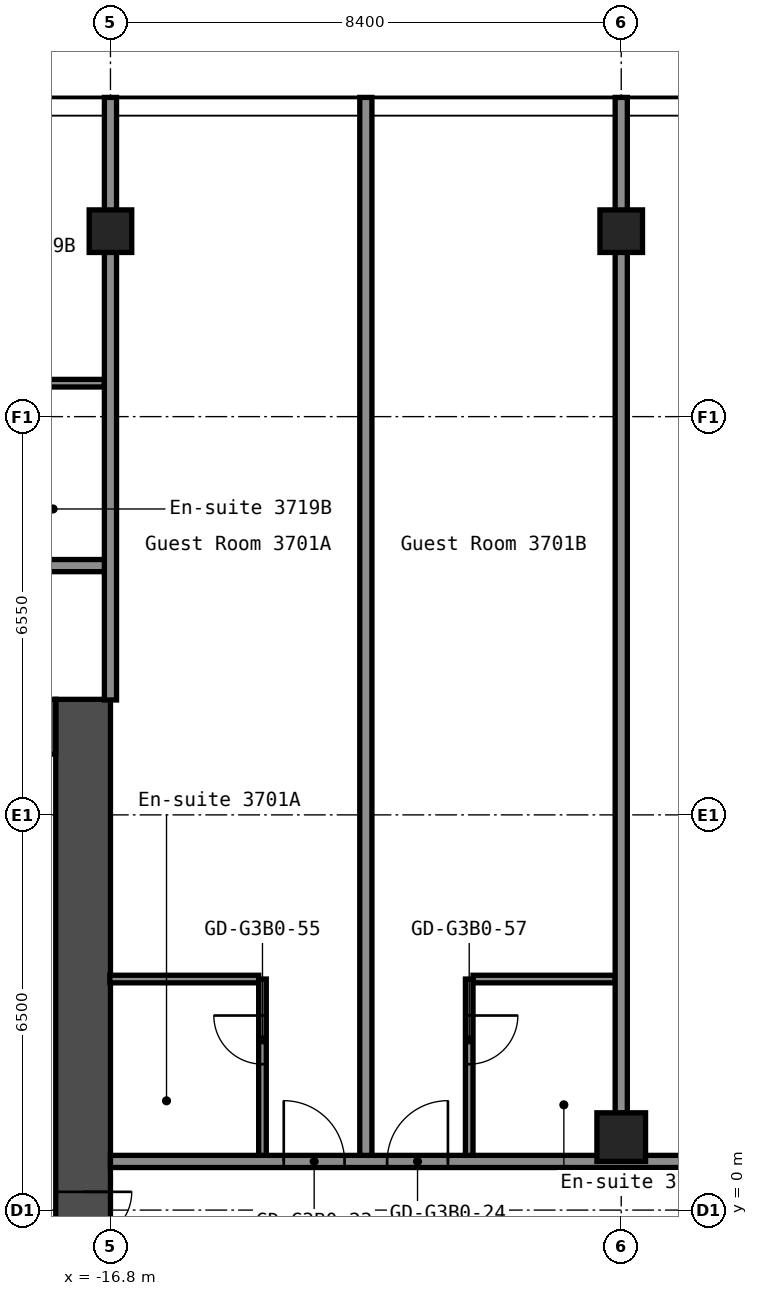
"""IFC4 building model, lengths in metres.
Left out: names, types, materials, properties, quantities, classifications, styles, units other than length and angle.
Written with IfcOpenShell. Run it as: python <this file> out.ifc"""

import sys

from ifc_helpers import new_model, si_unit, direction, frame, frame_2d, origin, origin_2d, place, context, subcontext, project, spatial, rectangle, hollow_rectangle, extrude, element, fill, save


model = new_model("IFC4")
c1 = context("Model", 3, precision=1e-05, world=origin(), true_north=direction((0.0, 1.0)))
c2 = subcontext(c1, "Body", "Model", "MODEL_VIEW")
j1 = project(units=[si_unit("LENGTHUNIT", "METRE"), si_unit("PLANEANGLEUNIT", "RADIAN")], contexts=[c1])
p1 = place(None, origin())
s1 = spatial("IfcSite", under=j1, at=p1, CompositionType="ELEMENT")
p2 = place(p1, origin())
s2 = spatial("IfcBuilding", under=s1, at=p2, CompositionType="ELEMENT")
p3 = place(p2, frame((0.0, 0.0, 134.2)))
s3 = spatial("IfcBuildingStorey", under=s2, at=p3, CompositionType="ELEMENT", Elevation=134.2)
p4 = place(p3, frame((-16.8, 16.1, 0.0), z_axis=(0.0, 0.0, 1.0), x_axis=(1.0, 0.0, 0.0)))
e1 = element("IfcColumn", 1, at=p4, inside=s3, PredefinedType="COLUMN", context=c2, shape_type="SweptSolid", body=[
    extrude(hollow_rectangle(XDim=0.7, YDim=0.7, WallThickness=0.028, at=origin_2d()), origin(), (0.0, 0.0, 1.0), 2.75),
])
p5 = place(p3, frame((-8.4, 1.2, 0.0), z_axis=(0.0, 0.0, 1.0), x_axis=(1.0, 0.0, 0.0)))
e2 = element("IfcColumn", 2, at=p5, inside=s3, PredefinedType="COLUMN", context=c2, shape_type="SweptSolid", body=[
    extrude(hollow_rectangle(XDim=0.8, YDim=0.8, WallThickness=0.032, at=origin_2d()), origin(), (0.0, 0.0, 1.0), 2.75),
])
p6 = place(p3, frame((-8.4, 16.1, 0.0), z_axis=(0.0, 0.0, 1.0), x_axis=(1.0, 0.0, 0.0)))
e3 = element("IfcColumn", 3, at=p6, inside=s3, PredefinedType="COLUMN", context=c2, shape_type="SweptSolid", body=[
    extrude(hollow_rectangle(XDim=0.7, YDim=0.7, WallThickness=0.028, at=origin_2d()), origin(), (0.0, 0.0, 1.0), 2.75),
])
p7 = place(p3, frame((-17.25, -8.4, 0.0), z_axis=(0.0, 0.0, 1.0), x_axis=(0.0, 1.0, 0.0)))
e4 = element("IfcWall", 4, at=p7, inside=s3, PredefinedType="SHEAR", context=c2, shape_type="SweptSolid", body=[
    extrude(rectangle(XDim=16.8, YDim=0.9, at=frame_2d((8.4, 0.0))), origin(), (0.0, 0.0, 1.0), 2.75),
])
p8 = place(p7, frame((7.1, 0.0, 0.0)))
e5 = element("IfcOpeningElement", 5, at=p8, cuts=e4, PredefinedType="OPENING", context=c2, shape_type="SweptSolid", body=[
    extrude(rectangle(XDim=1.6, YDim=2.1, at=frame_2d((0.8, 1.05))), frame((0.0, 0.46, 0.0), z_axis=(0.0, -1.0, 0.0), x_axis=(1.0, 0.0, 0.0)), (0.0, 0.0, 1.0), 0.92),
])
p9 = place(p3, frame((-32.7, 7.95, 0.0), z_axis=(0.0, 0.0, 1.0), x_axis=(1.0, 0.0, 0.0)))
e6 = element("IfcWall", 6, at=p9, inside=s3, PredefinedType="SHEAR", context=c2, shape_type="SweptSolid", body=[
    extrude(rectangle(XDim=15.0, YDim=0.9, at=frame_2d((7.5, 0.0))), origin(), (0.0, 0.0, 1.0), 2.75),
])
p10 = place(p9, frame((3.4, 0.0, 0.0)))
e7 = element("IfcOpeningElement", 7, at=p10, cuts=e6, PredefinedType="OPENING", context=c2, shape_type="SweptSolid", body=[
    extrude(rectangle(XDim=1.2, YDim=2.1, at=frame_2d((0.6, 1.05))), frame((0.0, 0.46, 0.0), z_axis=(0.0, -1.0, 0.0), x_axis=(1.0, 0.0, 0.0)), (0.0, 0.0, 1.0), 0.92),
])
p11 = place(p9, frame((0.75, 0.0, 0.0)))
e8 = element("IfcOpeningElement", 8, at=p11, cuts=e6, PredefinedType="OPENING", context=c2, shape_type="SweptSolid", body=[
    extrude(rectangle(XDim=0.9, YDim=2.1, at=frame_2d((0.45, 1.05))), frame((0.0, 0.46, 0.0), z_axis=(0.0, -1.0, 0.0), x_axis=(1.0, 0.0, 0.0)), (0.0, 0.0, 1.0), 0.92),
])
p12 = place(p3, frame((-16.8, 0.8, 0.0), z_axis=(0.0, 0.0, 1.0), x_axis=(1.0, 0.0, 0.0)))
e9 = element("IfcWall", 9, at=p12, inside=s3, PredefinedType="PARTITIONING", context=c2, shape_type="SweptSolid", body=[
    extrude(rectangle(XDim=33.6, YDim=0.2, at=frame_2d((16.8, 0.0))), origin(), (0.0, 0.0, 1.0), 2.75),
])
p13 = place(p12, frame((2.85, 0.0, 0.0)))
e10 = element("IfcOpeningElement", 10, at=p13, cuts=e9, PredefinedType="OPENING", context=c2, shape_type="SweptSolid", body=[
    extrude(rectangle(XDim=1.0, YDim=2.1, at=frame_2d((0.5, 1.05))), frame((0.0, 0.11, 0.0), z_axis=(0.0, -1.0, 0.0), x_axis=(1.0, 0.0, 0.0)), (0.0, 0.0, 1.0), 0.22),
])
p14 = place(p12, frame((4.55, 0.0, 0.0)))
e11 = element("IfcOpeningElement", 11, at=p14, cuts=e9, PredefinedType="OPENING", context=c2, shape_type="SweptSolid", body=[
    extrude(rectangle(XDim=1.0, YDim=2.1, at=frame_2d((0.5, 1.05))), frame((0.0, 0.11, 0.0), z_axis=(0.0, -1.0, 0.0), x_axis=(1.0, 0.0, 0.0)), (0.0, 0.0, 1.0), 0.22),
])
p15 = place(p12, frame((12.1, 0.0, 0.0)))
e12 = element("IfcOpeningElement", 12, at=p15, cuts=e9, PredefinedType="OPENING", context=c2, shape_type="SweptSolid", body=[
    extrude(rectangle(XDim=1.0, YDim=2.1, at=frame_2d((0.5, 1.05))), frame((0.0, 0.11, 0.0), z_axis=(0.0, -1.0, 0.0), x_axis=(1.0, 0.0, 0.0)), (0.0, 0.0, 1.0), 0.22),
])
p16 = place(p12, frame((19.65, 0.0, 0.0)))
e13 = element("IfcOpeningElement", 13, at=p16, cuts=e9, PredefinedType="OPENING", context=c2, shape_type="SweptSolid", body=[
    extrude(rectangle(XDim=1.0, YDim=2.1, at=frame_2d((0.5, 1.05))), frame((0.0, 0.11, 0.0), z_axis=(0.0, -1.0, 0.0), x_axis=(1.0, 0.0, 0.0)), (0.0, 0.0, 1.0), 0.22),
])
p17 = place(p12, frame((21.35, 0.0, 0.0)))
e14 = element("IfcOpeningElement", 14, at=p17, cuts=e9, PredefinedType="OPENING", context=c2, shape_type="SweptSolid", body=[
    extrude(rectangle(XDim=1.0, YDim=2.1, at=frame_2d((0.5, 1.05))), frame((0.0, 0.11, 0.0), z_axis=(0.0, -1.0, 0.0), x_axis=(1.0, 0.0, 0.0)), (0.0, 0.0, 1.0), 0.22),
])
p18 = place(p12, frame((28.05, 0.0, 0.0)))
e15 = element("IfcOpeningElement", 15, at=p18, cuts=e9, PredefinedType="OPENING", context=c2, shape_type="SweptSolid", body=[
    extrude(rectangle(XDim=1.0, YDim=2.1, at=frame_2d((0.5, 1.05))), frame((0.0, 0.11, 0.0), z_axis=(0.0, -1.0, 0.0), x_axis=(1.0, 0.0, 0.0)), (0.0, 0.0, 1.0), 0.22),
])
p19 = place(p12, frame((29.75, 0.0, 0.0)))
e16 = element("IfcOpeningElement", 16, at=p19, cuts=e9, PredefinedType="OPENING", context=c2, shape_type="SweptSolid", body=[
    extrude(rectangle(XDim=1.0, YDim=2.1, at=frame_2d((0.5, 1.05))), frame((0.0, 0.11, 0.0), z_axis=(0.0, -1.0, 0.0), x_axis=(1.0, 0.0, 0.0)), (0.0, 0.0, 1.0), 0.22),
])
p20 = place(p3, frame((-16.81, 3.8, 0.0), z_axis=(0.0, 0.0, 1.0), x_axis=(1.0, 0.0, 0.0)))
e17 = element("IfcWall", 17, at=p20, inside=s3, PredefinedType="PARTITIONING", context=c2, shape_type="SweptSolid", body=[
    extrude(rectangle(XDim=2.448, YDim=0.125, at=frame_2d((1.224, 0.0))), origin(), (0.0, 0.0, 1.0), 2.75),
])
p21 = place(p3, frame((-10.837, 3.8, 0.0), z_axis=(0.0, 0.0, 1.0), x_axis=(1.0, 0.0, 0.0)))
e18 = element("IfcWall", 18, at=p21, inside=s3, PredefinedType="PARTITIONING", context=c2, shape_type="SweptSolid", body=[
    extrude(rectangle(XDim=2.337, YDim=0.125, at=frame_2d((1.169, 0.0))), origin(), (0.0, 0.0, 1.0), 2.75),
])
p22 = place(p3, frame((-42.7, 10.6, 0.0), z_axis=(0.0, 0.0, 1.0), x_axis=(1.0, 0.0, 0.0)))
e19 = element("IfcWall", 19, at=p22, inside=s3, PredefinedType="PARTITIONING", context=c2, shape_type="SweptSolid", body=[
    extrude(rectangle(XDim=25.9, YDim=0.2, at=frame_2d((12.95, 0.0))), origin(), (0.0, 0.0, 1.0), 2.75),
])
p23 = place(p22, frame((3.25, 0.0, 0.0)))
e20 = element("IfcOpeningElement", 20, at=p23, cuts=e19, PredefinedType="OPENING", context=c2, shape_type="SweptSolid", body=[
    extrude(rectangle(XDim=1.0, YDim=2.1, at=frame_2d((0.5, 1.05))), frame((0.0, 0.11, 0.0), z_axis=(0.0, -1.0, 0.0), x_axis=(1.0, 0.0, 0.0)), (0.0, 0.0, 1.0), 0.22),
])
p24 = place(p22, frame((5.15, 0.0, 0.0)))
e21 = element("IfcOpeningElement", 21, at=p24, cuts=e19, PredefinedType="OPENING", context=c2, shape_type="SweptSolid", body=[
    extrude(rectangle(XDim=1.0, YDim=2.1, at=frame_2d((0.5, 1.05))), frame((0.0, 0.11, 0.0), z_axis=(0.0, -1.0, 0.0), x_axis=(1.0, 0.0, 0.0)), (0.0, 0.0, 1.0), 0.22),
])
p25 = place(p22, frame((11.95, 0.0, 0.0)))
e22 = element("IfcOpeningElement", 22, at=p25, cuts=e19, PredefinedType="OPENING", context=c2, shape_type="SweptSolid", body=[
    extrude(rectangle(XDim=1.0, YDim=2.1, at=frame_2d((0.5, 1.05))), frame((0.0, 0.11, 0.0), z_axis=(0.0, -1.0, 0.0), x_axis=(1.0, 0.0, 0.0)), (0.0, 0.0, 1.0), 0.22),
])
p26 = place(p22, frame((13.65, 0.0, 0.0)))
e23 = element("IfcOpeningElement", 23, at=p26, cuts=e19, PredefinedType="OPENING", context=c2, shape_type="SweptSolid", body=[
    extrude(rectangle(XDim=1.0, YDim=2.1, at=frame_2d((0.5, 1.05))), frame((0.0, 0.11, 0.0), z_axis=(0.0, -1.0, 0.0), x_axis=(1.0, 0.0, 0.0)), (0.0, 0.0, 1.0), 0.22),
])
p27 = place(p22, frame((20.35, 0.0, 0.0)))
e24 = element("IfcOpeningElement", 24, at=p27, cuts=e19, PredefinedType="OPENING", context=c2, shape_type="SweptSolid", body=[
    extrude(rectangle(XDim=1.0, YDim=2.1, at=frame_2d((0.5, 1.05))), frame((0.0, 0.11, 0.0), z_axis=(0.0, -1.0, 0.0), x_axis=(1.0, 0.0, 0.0)), (0.0, 0.0, 1.0), 0.22),
])
p28 = place(p22, frame((22.05, 0.0, 0.0)))
e25 = element("IfcOpeningElement", 25, at=p28, cuts=e19, PredefinedType="OPENING", context=c2, shape_type="SweptSolid", body=[
    extrude(rectangle(XDim=1.0, YDim=2.1, at=frame_2d((0.5, 1.05))), frame((0.0, 0.11, 0.0), z_axis=(0.0, -1.0, 0.0), x_axis=(1.0, 0.0, 0.0)), (0.0, 0.0, 1.0), 0.22),
])
p29 = place(p3, frame((-19.238, 13.6, 0.0), z_axis=(0.0, 0.0, 1.0), x_axis=(1.0, 0.0, 0.0)))
e26 = element("IfcWall", 26, at=p29, inside=s3, PredefinedType="PARTITIONING", context=c2, shape_type="SweptSolid", body=[
    extrude(rectangle(XDim=2.338, YDim=0.125, at=frame_2d((1.169, 0.0))), origin(), (0.0, 0.0, 1.0), 2.75),
])
p30 = place(p3, frame((-16.8, 8.39, 0.0), z_axis=(0.0, 0.0, 1.0), x_axis=(0.0, 1.0, 0.0)))
e27 = element("IfcWall", 27, at=p30, inside=s3, PredefinedType="PARTITIONING", context=c2, shape_type="SweptSolid", body=[
    extrude(rectangle(XDim=9.91, YDim=0.2, at=frame_2d((4.955, 0.0))), origin(), (0.0, 0.0, 1.0), 2.75),
])
p31 = place(p3, frame((-14.3, 0.9, 0.0), z_axis=(0.0, 0.0, 1.0), x_axis=(0.0, 1.0, 0.0)))
e28 = element("IfcWall", 28, at=p31, inside=s3, PredefinedType="PARTITIONING", context=c2, shape_type="SweptSolid", body=[
    extrude(rectangle(XDim=2.9, YDim=0.125, at=frame_2d((1.45, 0.0))), origin(), (0.0, 0.0, 1.0), 2.75),
])
p32 = place(p31, frame((1.5, 0.0, 0.0)))
e29 = element("IfcOpeningElement", 29, at=p32, cuts=e28, PredefinedType="OPENING", context=c2, shape_type="SweptSolid", body=[
    extrude(rectangle(XDim=0.8, YDim=2.1, at=frame_2d((0.4, 1.05))), frame((0.0, 0.073, 0.0), z_axis=(0.0, -1.0, 0.0), x_axis=(1.0, 0.0, 0.0)), (0.0, 0.0, 1.0), 0.145),
])
p33 = place(p3, frame((-12.6, 0.9, 0.0), z_axis=(0.0, 0.0, 1.0), x_axis=(0.0, 1.0, 0.0)))
e30 = element("IfcWall", 30, at=p33, inside=s3, PredefinedType="PARTITIONING", context=c2, shape_type="SweptSolid", body=[
    extrude(rectangle(XDim=17.4, YDim=0.2, at=frame_2d((8.7, 0.0))), origin(), (0.0, 0.0, 1.0), 2.75),
])
p34 = place(p3, frame((-10.9, 0.9, 0.0), z_axis=(0.0, 0.0, 1.0), x_axis=(0.0, 1.0, 0.0)))
e31 = element("IfcWall", 31, at=p34, inside=s3, PredefinedType="PARTITIONING", context=c2, shape_type="SweptSolid", body=[
    extrude(rectangle(XDim=2.9, YDim=0.125, at=frame_2d((1.45, 0.0))), origin(), (0.0, 0.0, 1.0), 2.75),
])
p35 = place(p34, frame((1.5, 0.0, 0.0)))
e32 = element("IfcOpeningElement", 32, at=p35, cuts=e31, PredefinedType="OPENING", context=c2, shape_type="SweptSolid", body=[
    extrude(rectangle(XDim=0.8, YDim=2.1, at=frame_2d((0.4, 1.05))), frame((0.0, 0.073, 0.0), z_axis=(0.0, -1.0, 0.0), x_axis=(1.0, 0.0, 0.0)), (0.0, 0.0, 1.0), 0.145),
])
p36 = place(p3, frame((-8.4, 1.59, 0.0), z_axis=(0.0, 0.0, 1.0), x_axis=(0.0, 1.0, 0.0)))
e33 = element("IfcWall", 33, at=p36, inside=s3, PredefinedType="PARTITIONING", context=c2, shape_type="SweptSolid", body=[
    extrude(rectangle(XDim=16.71, YDim=0.2, at=frame_2d((8.355, 0.0))), origin(), (0.0, 0.0, 1.0), 2.75),
])
p37 = place(p8, origin())
e34 = element("IfcDoor", 34, at=p37, inside=s3, OperationType="DOUBLE_DOOR_SINGLE_SWING", PredefinedType="DOOR", context=c2, shape_type="SweptSolid", body=[
    extrude(rectangle(XDim=1.6, YDim=2.1, at=frame_2d((0.8, 1.05))), frame((0.0, 0.025, 0.0), z_axis=(0.0, -1.0, 0.0), x_axis=(1.0, 0.0, 0.0)), (0.0, 0.0, 1.0), 0.05),
])
fill(e5, e34)
p38 = place(p13, origin())
e35 = element("IfcDoor", 35, at=p38, inside=s3, OperationType="SINGLE_SWING_RIGHT", PredefinedType="DOOR", context=c2, shape_type="SweptSolid", body=[
    extrude(rectangle(XDim=1.0, YDim=2.1, at=frame_2d((0.5, 1.05))), frame((0.0, 0.025, 0.0), z_axis=(0.0, -1.0, 0.0), x_axis=(1.0, 0.0, 0.0)), (0.0, 0.0, 1.0), 0.05),
])
fill(e10, e35)
p39 = place(p14, origin())
e36 = element("IfcDoor", 36, at=p39, inside=s3, OperationType="SINGLE_SWING_LEFT", PredefinedType="DOOR", context=c2, shape_type="SweptSolid", body=[
    extrude(rectangle(XDim=1.0, YDim=2.1, at=frame_2d((0.5, 1.05))), frame((0.0, 0.025, 0.0), z_axis=(0.0, -1.0, 0.0), x_axis=(1.0, 0.0, 0.0)), (0.0, 0.0, 1.0), 0.05),
])
fill(e11, e36)
p40 = place(p32, origin())
e37 = element("IfcDoor", 37, at=p40, inside=s3, OperationType="SINGLE_SWING_LEFT", PredefinedType="DOOR", context=c2, shape_type="SweptSolid", body=[
    extrude(rectangle(XDim=0.8, YDim=2.1, at=frame_2d((0.4, 1.05))), frame((0.0, 0.025, 0.0), z_axis=(0.0, -1.0, 0.0), x_axis=(1.0, 0.0, 0.0)), (0.0, 0.0, 1.0), 0.05),
])
fill(e29, e37)
p41 = place(p35, origin())
e38 = element("IfcDoor", 38, at=p41, inside=s3, OperationType="SINGLE_SWING_RIGHT", PredefinedType="DOOR", context=c2, shape_type="SweptSolid", body=[
    extrude(rectangle(XDim=0.8, YDim=2.1, at=frame_2d((0.4, 1.05))), frame((0.0, 0.025, 0.0), z_axis=(0.0, -1.0, 0.0), x_axis=(1.0, 0.0, 0.0)), (0.0, 0.0, 1.0), 0.05),
])
fill(e32, e38)
save(model, sys.argv[1])
